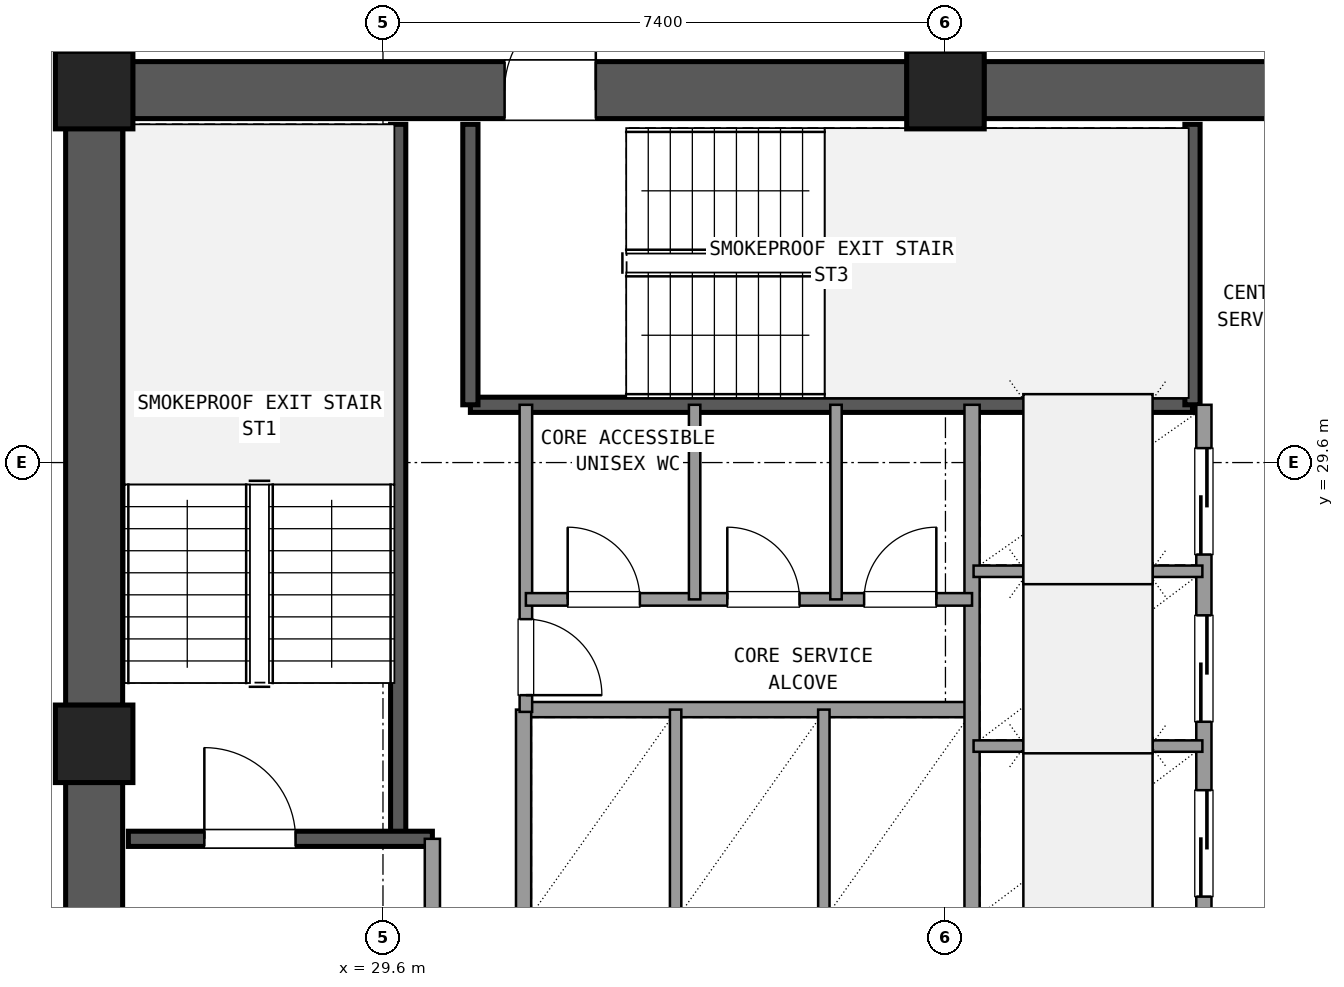
"""IFC4 building model, lengths in metres.
Left out: names, types, materials, properties, quantities, classifications, styles, units other than length and angle.
Written with IfcOpenShell. Run it as: python <this file> out.ifc"""

import sys

from ifc_helpers import new_model, si_unit, direction, frame, frame_2d, origin, origin_2d, place, context, subcontext, project, spatial, rectangle, extrude, element, fill, save


model = new_model("IFC4")
c1 = context("Model", 3, precision=1e-05, world=origin(), true_north=direction((0.0, 1.0)))
c2 = subcontext(c1, "Body", "Model", "MODEL_VIEW")
j1 = project(units=[si_unit("LENGTHUNIT", "METRE"), si_unit("PLANEANGLEUNIT", "RADIAN")], contexts=[c1])
p1 = place(None, origin())
s1 = spatial("IfcSite", under=j1, at=p1, CompositionType="ELEMENT")
p2 = place(p1, origin())
s2 = spatial("IfcBuilding", under=s1, at=p2, CompositionType="ELEMENT")
p3 = place(p2, frame((0.0, 0.0, 84.78)))
s3 = spatial("IfcBuildingStorey", under=s2, at=p3, CompositionType="ELEMENT", Elevation=84.78)
for number, where, z_axis, x_axis in (
    (1, (37.0, 34.5, 0.0), (0.0, 0.0, 1.0), (1.0, 0.0, 0.0)),
    (2, (25.8, 34.5, 0.0), (0.0, 0.0, 1.0), (1.0, 0.0, 0.0)),
    (3, (25.8, 25.9, 0.0), (0.0, 0.0, 1.0), (1.0, 0.0, 0.0)),
):
    element("IfcColumn", number, at=place(p3, frame(where, z_axis=z_axis, x_axis=x_axis)), inside=s3, PredefinedType="COLUMN", context=c2, shape_type="SweptSolid", body=[
        extrude(rectangle(XDim=1.02, YDim=1.02, at=origin_2d()), origin(), (0.0, 0.0, 1.0), 3.6),
    ])
p4 = place(p3, frame((47.695, 34.5, 0.0), z_axis=(0.0, 0.0, 1.0), x_axis=(-1.0, 0.0, 0.0)))
e4 = element("IfcWall", 4, at=p4, inside=s3, PredefinedType="SHEAR", context=c2, shape_type="SweptSolid", body=[
    extrude(rectangle(XDim=10.19, YDim=0.75, at=frame_2d((5.095, 0.0))), origin(), (0.0, 0.0, 1.0), 3.32),
])
p5 = place(p4, frame((4.595, 0.0, 0.0)))
e5 = element("IfcOpeningElement", 5, at=p5, cuts=e4, PredefinedType="OPENING", context=c2, shape_type="SweptSolid", body=[
    extrude(rectangle(XDim=1.6, YDim=2.2, at=frame_2d((0.8, 1.1))), frame((0.0, 0.385, 0.0), z_axis=(0.0, -1.0, 0.0), x_axis=(1.0, 0.0, 0.0)), (0.0, 0.0, 1.0), 0.77),
])
p6 = place(p3, frame((36.495, 34.5, 0.0), z_axis=(0.0, 0.0, 1.0), x_axis=(-1.0, 0.0, 0.0)))
e6 = element("IfcWall", 6, at=p6, inside=s3, PredefinedType="SHEAR", context=c2, shape_type="SweptSolid", body=[
    extrude(rectangle(XDim=10.19, YDim=0.75, at=frame_2d((5.095, 0.0))), origin(), (0.0, 0.0, 1.0), 3.32),
])
p7 = place(p6, frame((4.095, 0.0, 0.0)))
e7 = element("IfcOpeningElement", 7, at=p7, cuts=e6, PredefinedType="OPENING", context=c2, shape_type="SweptSolid", body=[
    extrude(rectangle(XDim=1.2, YDim=2.15, at=frame_2d((0.6, 1.075))), frame((0.0, 0.385, 0.0), z_axis=(0.0, -1.0, 0.0), x_axis=(1.0, 0.0, 0.0)), (0.0, 0.0, 1.0), 0.77),
])
p8 = place(p3, frame((25.8, 33.995, 0.0), z_axis=(0.0, 0.0, 1.0), x_axis=(0.0, -1.0, 0.0)))
e8 = element("IfcWall", 8, at=p8, inside=s3, PredefinedType="SHEAR", context=c2, shape_type="SweptSolid", body=[
    extrude(rectangle(XDim=7.59, YDim=0.75, at=frame_2d((3.795, 0.0))), origin(), (0.0, 0.0, 1.0), 3.32),
])
p9 = place(p3, frame((25.8, 25.395, 0.0), z_axis=(0.0, 0.0, 1.0), x_axis=(0.0, -1.0, 0.0)))
e9 = element("IfcWall", 9, at=p9, inside=s3, PredefinedType="SHEAR", context=c2, shape_type="SweptSolid", body=[
    extrude(rectangle(XDim=7.59, YDim=0.75, at=frame_2d((3.795, 0.0))), origin(), (0.0, 0.0, 1.0), 3.32),
])
p10 = place(p9, frame((2.145, 0.0, 0.0)))
e10 = element("IfcOpeningElement", 10, at=p10, cuts=e9, PredefinedType="OPENING", context=c2, shape_type="SweptSolid", body=[
    extrude(rectangle(XDim=1.2, YDim=2.15, at=frame_2d((0.6, 1.075))), frame((0.0, 0.385, 0.0), z_axis=(0.0, -1.0, 0.0), x_axis=(1.0, 0.0, 0.0)), (0.0, 0.0, 1.0), 0.77),
])
p11 = place(p3, frame((29.8, 24.65, 0.0), z_axis=(0.0, 0.0, 1.0), x_axis=(0.0, 1.0, 0.0)))
e11 = element("IfcWall", 11, at=p11, inside=s3, PredefinedType="SHEAR", context=c2, shape_type="SweptSolid", body=[
    extrude(rectangle(XDim=9.4, YDim=0.2, at=frame_2d((4.7, 0.0))), origin(), (0.0, 0.0, 1.0), 3.32),
])
p12 = place(p3, frame((26.25, 24.65, 0.0), z_axis=(0.0, 0.0, 1.0), x_axis=(1.0, 0.0, 0.0)))
e12 = element("IfcWall", 12, at=p12, inside=s3, PredefinedType="SHEAR", context=c2, shape_type="SweptSolid", body=[
    extrude(rectangle(XDim=4.0, YDim=0.2, at=frame_2d((2.0, 0.0))), origin(), (0.0, 0.0, 1.0), 3.32),
])
p13 = place(p12, frame((1.0, 0.0, 0.0)))
e13 = element("IfcOpeningElement", 13, at=p13, cuts=e12, PredefinedType="OPENING", context=c2, shape_type="SweptSolid", body=[
    extrude(rectangle(XDim=1.2, YDim=2.15, at=frame_2d((0.6, 1.075))), frame((0.0, 0.11, 0.0), z_axis=(0.0, -1.0, 0.0), x_axis=(1.0, 0.0, 0.0)), (0.0, 0.0, 1.0), 0.22),
])
p14 = place(p3, frame((30.75, 30.36, 0.0), z_axis=(0.0, 0.0, 1.0), x_axis=(1.0, 0.0, 0.0)))
e14 = element("IfcWall", 14, at=p14, inside=s3, PredefinedType="SHEAR", context=c2, shape_type="SweptSolid", body=[
    extrude(rectangle(XDim=9.5, YDim=0.2, at=frame_2d((4.75, 0.0))), origin(), (0.0, 0.0, 1.0), 3.32),
])
for number, where, z_axis, x_axis in (
    (15, (30.75, 30.36, 0.0), (0.0, 0.0, 1.0), (0.0, 1.0, 0.0)),
    (16, (40.25, 30.36, 0.0), (0.0, 0.0, 1.0), (0.0, 1.0, 0.0)),
):
    element("IfcWall", number, at=place(p3, frame(where, z_axis=z_axis, x_axis=x_axis)), inside=s3, PredefinedType="SHEAR", context=c2, shape_type="SweptSolid", body=[
        extrude(rectangle(XDim=3.69, YDim=0.2, at=frame_2d((1.845, 0.0))), origin(), (0.0, 0.0, 1.0), 3.32),
    ])
p15 = place(p3, frame((30.25, 17.75, 0.0), z_axis=(0.0, 0.0, 1.0), x_axis=(0.0, 1.0, 0.0)))
e17 = element("IfcWall", 17, at=p15, inside=s3, PredefinedType="SOLIDWALL", context=c2, shape_type="SweptSolid", body=[
    extrude(rectangle(XDim=6.9, YDim=0.2, at=frame_2d((3.45, 0.0))), origin(), (0.0, 0.0, 1.0), 2.61),
])
p16 = place(p15, frame((4.15, 0.0, 0.0)))
e18 = element("IfcOpeningElement", 18, at=p16, cuts=e17, PredefinedType="OPENING", context=c2, shape_type="SweptSolid", body=[
    extrude(rectangle(XDim=1.2, YDim=2.15, at=frame_2d((0.6, 1.075))), frame((0.0, 0.11, 0.0), z_axis=(0.0, -1.0, 0.0), x_axis=(1.0, 0.0, 0.0)), (0.0, 0.0, 1.0), 0.22),
])
p17 = place(p3, frame((31.45, 26.35, 0.0), z_axis=(0.0, 0.0, 1.0), x_axis=(1.0, 0.0, 0.0)))
e19 = element("IfcWall", 19, at=p17, inside=s3, PredefinedType="SOLIDWALL", context=c2, shape_type="SweptSolid", body=[
    extrude(rectangle(XDim=5.9, YDim=0.2, at=frame_2d((2.95, 0.0))), origin(), (0.0, 0.0, 1.0), 2.61),
])
p18 = place(p3, frame((31.45, 23.54, 0.0), z_axis=(0.0, 0.0, 1.0), x_axis=(0.0, 1.0, 0.0)))
e20 = element("IfcWall", 20, at=p18, inside=s3, PredefinedType="SOLIDWALL", context=c2, shape_type="SweptSolid", body=[
    extrude(rectangle(XDim=2.81, YDim=0.2, at=frame_2d((1.405, 0.0))), origin(), (0.0, 0.0, 1.0), 2.61),
])
for number, where, z_axis, x_axis in (
    (21, (33.45, 23.54, 0.0), (0.0, 0.0, 1.0), (0.0, 1.0, 0.0)),
    (22, (35.4, 23.54, 0.0), (0.0, 0.0, 1.0), (0.0, 1.0, 0.0)),
):
    element("IfcWall", number, at=place(p3, frame(where, z_axis=z_axis, x_axis=x_axis)), inside=s3, PredefinedType="PARTITIONING", context=c2, shape_type="SweptSolid", body=[
        extrude(rectangle(XDim=2.81, YDim=0.15, at=frame_2d((1.405, 0.0))), origin(), (0.0, 0.0, 1.0), 2.61),
    ])
p19 = place(p3, frame((37.35, 23.54, 0.0), z_axis=(0.0, 0.0, 1.0), x_axis=(0.0, 1.0, 0.0)))
e23 = element("IfcWall", 23, at=p19, inside=s3, PredefinedType="SOLIDWALL", context=c2, shape_type="SweptSolid", body=[
    extrude(rectangle(XDim=6.82, YDim=0.2, at=frame_2d((3.41, 0.0))), origin(), (0.0, 0.0, 1.0), 2.61),
])
p20 = place(p3, frame((40.4, 23.54, 0.0), z_axis=(0.0, 0.0, 1.0), x_axis=(0.0, 1.0, 0.0)))
e24 = element("IfcWall", 24, at=p20, inside=s3, PredefinedType="SOLIDWALL", context=c2, shape_type="SweptSolid", body=[
    extrude(rectangle(XDim=6.82, YDim=0.2, at=frame_2d((3.41, 0.0))), origin(), (0.0, 0.0, 1.0), 2.61),
])
p21 = place(p20, frame((0.35, 0.0, 0.0)))
e25 = element("IfcOpeningElement", 25, at=p21, cuts=e24, PredefinedType="OPENING", context=c2, shape_type="SweptSolid", body=[
    extrude(rectangle(XDim=1.4, YDim=2.2, at=frame_2d((0.7, 1.1))), frame((0.0, 0.11, 0.0), z_axis=(0.0, -1.0, 0.0), x_axis=(1.0, 0.0, 0.0)), (0.0, 0.0, 1.0), 0.22),
])
p22 = place(p20, frame((2.65, 0.0, 0.0)))
e26 = element("IfcOpeningElement", 26, at=p22, cuts=e24, PredefinedType="OPENING", context=c2, shape_type="SweptSolid", body=[
    extrude(rectangle(XDim=1.4, YDim=2.2, at=frame_2d((0.7, 1.1))), frame((0.0, 0.11, 0.0), z_axis=(0.0, -1.0, 0.0), x_axis=(1.0, 0.0, 0.0)), (0.0, 0.0, 1.0), 0.22),
])
p23 = place(p20, frame((4.85, 0.0, 0.0)))
e27 = element("IfcOpeningElement", 27, at=p23, cuts=e24, PredefinedType="OPENING", context=c2, shape_type="SweptSolid", body=[
    extrude(rectangle(XDim=1.4, YDim=2.2, at=frame_2d((0.7, 1.1))), frame((0.0, 0.11, 0.0), z_axis=(0.0, -1.0, 0.0), x_axis=(1.0, 0.0, 0.0)), (0.0, 0.0, 1.0), 0.22),
])
for number, where, z_axis, x_axis in (
    (28, (37.37, 25.87, 0.0), (0.0, 0.0, 1.0), (1.0, 0.0, 0.0)),
    (29, (37.37, 28.17, 0.0), (0.0, 0.0, 1.0), (1.0, 0.0, 0.0)),
):
    element("IfcWall", number, at=place(p3, frame(where, z_axis=z_axis, x_axis=x_axis)), inside=s3, PredefinedType="PARTITIONING", context=c2, shape_type="SweptSolid", body=[
        extrude(rectangle(XDim=3.01, YDim=0.15, at=frame_2d((1.505, 0.0))), origin(), (0.0, 0.0, 1.0), 2.61),
    ])
p24 = place(p3, frame((31.48, 26.32, 0.0), z_axis=(0.0, 0.0, 1.0), x_axis=(0.0, 1.0, 0.0)))
e30 = element("IfcWall", 30, at=p24, inside=s3, PredefinedType="PLUMBINGWALL", context=c2, shape_type="SweptSolid", body=[
    extrude(rectangle(XDim=4.04, YDim=0.165, at=frame_2d((2.02, 0.0))), origin(), (0.0, 0.0, 1.0), 2.61),
])
p25 = place(p24, frame((0.22, 0.0, 0.0)))
e31 = element("IfcOpeningElement", 31, at=p25, cuts=e30, PredefinedType="OPENING", context=c2, shape_type="SweptSolid", body=[
    extrude(rectangle(XDim=1.0, YDim=2.15, at=frame_2d((0.5, 1.075))), frame((0.0, 0.093, 0.0), z_axis=(0.0, -1.0, 0.0), x_axis=(1.0, 0.0, 0.0)), (0.0, 0.0, 1.0), 0.185),
])
p26 = place(p3, frame((31.48, 27.8, 0.0), z_axis=(0.0, 0.0, 1.0), x_axis=(1.0, 0.0, 0.0)))
e32 = element("IfcWall", 32, at=p26, inside=s3, PredefinedType="PLUMBINGWALL", context=c2, shape_type="SweptSolid", body=[
    extrude(rectangle(XDim=5.87, YDim=0.165, at=frame_2d((2.935, 0.0))), origin(), (0.0, 0.0, 1.0), 2.61),
])
p27 = place(p26, frame((0.55, 0.0, 0.0)))
e33 = element("IfcOpeningElement", 33, at=p27, cuts=e32, PredefinedType="OPENING", context=c2, shape_type="SweptSolid", body=[
    extrude(rectangle(XDim=0.95, YDim=2.1, at=frame_2d((0.475, 1.05))), frame((0.0, 0.093, 0.0), z_axis=(0.0, -1.0, 0.0), x_axis=(1.0, 0.0, 0.0)), (0.0, 0.0, 1.0), 0.185),
])
p28 = place(p26, frame((2.65, 0.0, 0.0)))
e34 = element("IfcOpeningElement", 34, at=p28, cuts=e32, PredefinedType="OPENING", context=c2, shape_type="SweptSolid", body=[
    extrude(rectangle(XDim=0.95, YDim=2.1, at=frame_2d((0.475, 1.05))), frame((0.0, 0.093, 0.0), z_axis=(0.0, -1.0, 0.0), x_axis=(1.0, 0.0, 0.0)), (0.0, 0.0, 1.0), 0.185),
])
p29 = place(p26, frame((4.45, 0.0, 0.0)))
e35 = element("IfcOpeningElement", 35, at=p29, cuts=e32, PredefinedType="OPENING", context=c2, shape_type="SweptSolid", body=[
    extrude(rectangle(XDim=0.95, YDim=2.1, at=frame_2d((0.475, 1.05))), frame((0.0, 0.093, 0.0), z_axis=(0.0, -1.0, 0.0), x_axis=(1.0, 0.0, 0.0)), (0.0, 0.0, 1.0), 0.185),
])
for number, where, z_axis, x_axis in (
    (36, (33.7, 27.8, 0.0), (0.0, 0.0, 1.0), (0.0, 1.0, 0.0)),
    (37, (35.56, 27.8, 0.0), (0.0, 0.0, 1.0), (0.0, 1.0, 0.0)),
):
    element("IfcWall", number, at=place(p3, frame(where, z_axis=z_axis, x_axis=x_axis)), inside=s3, PredefinedType="PARTITIONING", context=c2, shape_type="SweptSolid", body=[
        extrude(rectangle(XDim=2.56, YDim=0.15, at=frame_2d((1.28, 0.0))), origin(), (0.0, 0.0, 1.0), 2.61),
    ])
p30 = place(p3, frame((37.0, 34.95, 0.0), z_axis=(0.0, 0.0, 1.0), x_axis=(0.0, 1.0, 0.0)))
e38 = element("IfcWall", 38, at=p30, inside=s3, PredefinedType="PARTITIONING", context=c2, shape_type="SweptSolid", body=[
    extrude(rectangle(XDim=3.21, YDim=0.18, at=frame_2d((1.605, 0.0))), origin(), (0.0, 0.0, 1.0), 2.61),
])
p31 = place(p30, frame((0.605, 0.0, 0.0)))
e39 = element("IfcOpeningElement", 39, at=p31, cuts=e38, PredefinedType="OPENING", context=c2, shape_type="SweptSolid", body=[
    extrude(rectangle(XDim=2.0, YDim=2.2, at=frame_2d((1.0, 1.1))), frame((0.0, 0.1, 0.0), z_axis=(0.0, -1.0, 0.0), x_axis=(1.0, 0.0, 0.0)), (0.0, 0.0, 1.0), 0.2),
])
p32 = place(p13, origin())
e40 = element("IfcDoor", 40, at=p32, inside=s3, OperationType="SINGLE_SWING_LEFT", PredefinedType="DOOR", context=c2, shape_type="SweptSolid", body=[
    extrude(rectangle(XDim=1.2, YDim=2.15, at=frame_2d((0.6, 1.075))), frame((0.0, 0.025, 0.0), z_axis=(0.0, -1.0, 0.0), x_axis=(1.0, 0.0, 0.0)), (0.0, 0.0, 1.0), 0.05),
])
fill(e13, e40)
p33 = place(p7, frame((1.2, 0.0, 0.0), z_axis=(0.0, 0.0, 1.0), x_axis=(-1.0, 0.0, 0.0)))
e41 = element("IfcDoor", 41, at=p33, inside=s3, OperationType="SINGLE_SWING_LEFT", PredefinedType="DOOR", context=c2, shape_type="SweptSolid", body=[
    extrude(rectangle(XDim=1.2, YDim=2.15, at=frame_2d((0.6, 1.075))), frame((0.0, 0.025, 0.0), z_axis=(0.0, -1.0, 0.0), x_axis=(1.0, 0.0, 0.0)), (0.0, 0.0, 1.0), 0.05),
])
fill(e7, e41)
p34 = place(p21, origin())
e42 = element("IfcDoor", 42, at=p34, inside=s3, OperationType="SLIDING_TO_LEFT", PredefinedType="DOOR", context=c2, shape_type="SweptSolid", body=[
    extrude(rectangle(XDim=1.4, YDim=2.2, at=frame_2d((0.7, 1.1))), frame((0.0, 0.025, 0.0), z_axis=(0.0, -1.0, 0.0), x_axis=(1.0, 0.0, 0.0)), (0.0, 0.0, 1.0), 0.05),
])
fill(e25, e42)
p35 = place(p22, origin())
e43 = element("IfcDoor", 43, at=p35, inside=s3, OperationType="SLIDING_TO_LEFT", PredefinedType="DOOR", context=c2, shape_type="SweptSolid", body=[
    extrude(rectangle(XDim=1.4, YDim=2.2, at=frame_2d((0.7, 1.1))), frame((0.0, 0.025, 0.0), z_axis=(0.0, -1.0, 0.0), x_axis=(1.0, 0.0, 0.0)), (0.0, 0.0, 1.0), 0.05),
])
fill(e26, e43)
p36 = place(p23, origin())
e44 = element("IfcDoor", 44, at=p36, inside=s3, OperationType="SLIDING_TO_RIGHT", PredefinedType="DOOR", context=c2, shape_type="SweptSolid", body=[
    extrude(rectangle(XDim=1.4, YDim=2.2, at=frame_2d((0.7, 1.1))), frame((0.0, 0.025, 0.0), z_axis=(0.0, -1.0, 0.0), x_axis=(1.0, 0.0, 0.0)), (0.0, 0.0, 1.0), 0.05),
])
fill(e27, e44)
p37 = place(p25, frame((1.0, 0.0, 0.0), z_axis=(0.0, 0.0, 1.0), x_axis=(-1.0, 0.0, 0.0)))
e45 = element("IfcDoor", 45, at=p37, inside=s3, OperationType="SINGLE_SWING_LEFT", PredefinedType="DOOR", context=c2, shape_type="SweptSolid", body=[
    extrude(rectangle(XDim=1.0, YDim=2.15, at=frame_2d((0.5, 1.075))), frame((0.0, 0.025, 0.0), z_axis=(0.0, -1.0, 0.0), x_axis=(1.0, 0.0, 0.0)), (0.0, 0.0, 1.0), 0.05),
])
fill(e31, e45)
p38 = place(p27, origin())
e46 = element("IfcDoor", 46, at=p38, inside=s3, OperationType="SINGLE_SWING_LEFT", PredefinedType="DOOR", context=c2, shape_type="SweptSolid", body=[
    extrude(rectangle(XDim=0.95, YDim=2.1, at=frame_2d((0.475, 1.05))), frame((0.0, 0.025, 0.0), z_axis=(0.0, -1.0, 0.0), x_axis=(1.0, 0.0, 0.0)), (0.0, 0.0, 1.0), 0.05),
])
fill(e33, e46)
p39 = place(p28, origin())
e47 = element("IfcDoor", 47, at=p39, inside=s3, OperationType="SINGLE_SWING_LEFT", PredefinedType="DOOR", context=c2, shape_type="SweptSolid", body=[
    extrude(rectangle(XDim=0.95, YDim=2.1, at=frame_2d((0.475, 1.05))), frame((0.0, 0.025, 0.0), z_axis=(0.0, -1.0, 0.0), x_axis=(1.0, 0.0, 0.0)), (0.0, 0.0, 1.0), 0.05),
])
fill(e34, e47)
p40 = place(p29, origin())
e48 = element("IfcDoor", 48, at=p40, inside=s3, OperationType="SINGLE_SWING_RIGHT", PredefinedType="DOOR", context=c2, shape_type="SweptSolid", body=[
    extrude(rectangle(XDim=0.95, YDim=2.1, at=frame_2d((0.475, 1.05))), frame((0.0, 0.025, 0.0), z_axis=(0.0, -1.0, 0.0), x_axis=(1.0, 0.0, 0.0)), (0.0, 0.0, 1.0), 0.05),
])
fill(e35, e48)
save(model, sys.argv[1])
